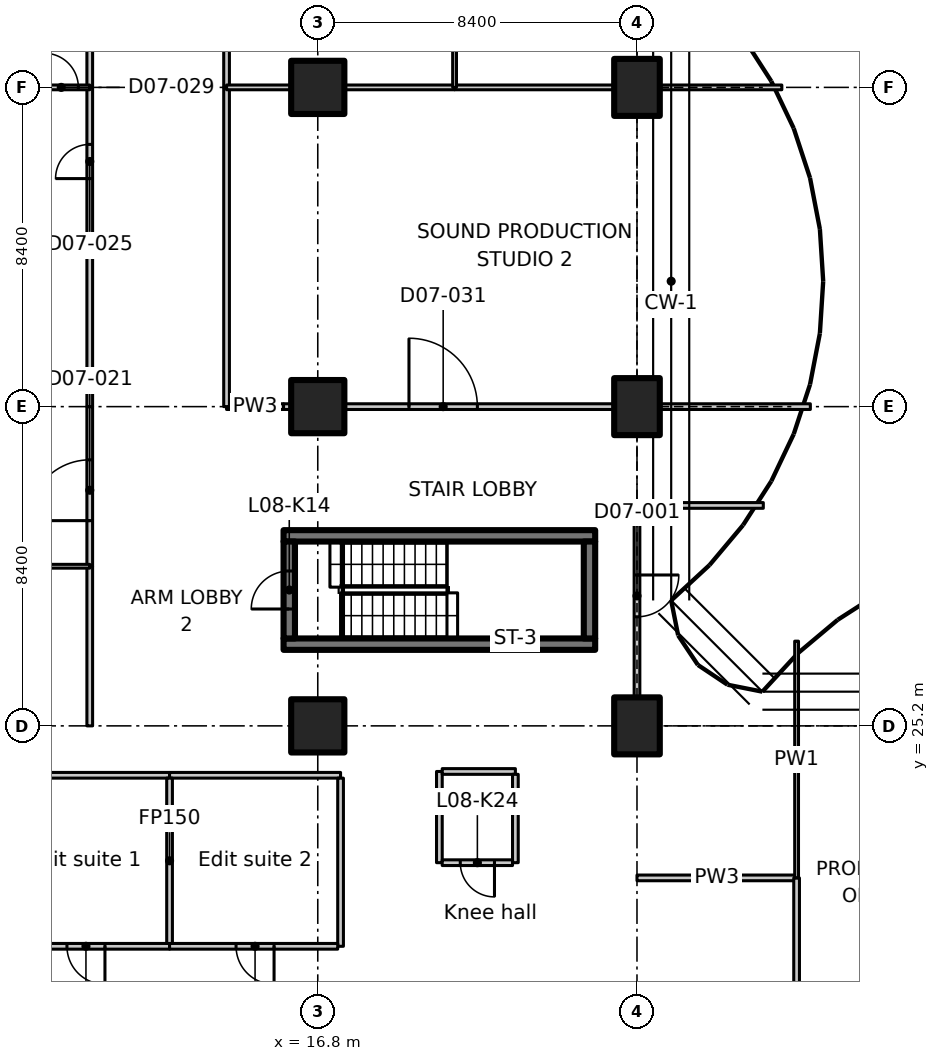
"""IFC4 building model, lengths in metres.
Left out: names, types, materials, properties, quantities, classifications, styles, units other than length and angle.
Written with IfcOpenShell. Run it as: python <this file> out.ifc"""

import sys

from ifc_helpers import new_model, si_unit, direction, frame, frame_2d, origin, origin_2d, place, context, subcontext, project, spatial, polyline, rectangle, outline, extrude, element, fill, save


model = new_model("IFC4")
c1 = context("Model", 3, precision=1e-05, world=origin(), true_north=direction((0.0, 1.0)))
c2 = subcontext(c1, "Body", "Model", "MODEL_VIEW")
j1 = project(units=[si_unit("LENGTHUNIT", "METRE"), si_unit("PLANEANGLEUNIT", "RADIAN")], contexts=[c1])
p1 = place(None, origin())
s1 = spatial("IfcSite", under=j1, at=p1, CompositionType="ELEMENT")
p2 = place(p1, origin())
s2 = spatial("IfcBuilding", under=s1, at=p2, CompositionType="ELEMENT")
p3 = place(p2, frame((0.0, 0.0, 43.7)))
s3 = spatial("IfcBuildingStorey", under=s2, at=p3, CompositionType="ELEMENT", Elevation=43.7)
for number, where, z_axis, x_axis in (
    (1, (16.8, 25.2, 0.0), (0.0, 0.0, 1.0), (1.0, 0.0, 0.0)),
    (2, (16.8, 33.6, 0.0), (0.0, 0.0, 1.0), (1.0, 0.0, 0.0)),
    (3, (16.8, 42.0, 0.0), (0.0, 0.0, 1.0), (1.0, 0.0, 0.0)),
):
    element("IfcColumn", number, at=place(p3, frame(where, z_axis=z_axis, x_axis=x_axis)), inside=s3, PredefinedType="COLUMN", context=c2, shape_type="SweptSolid", body=[
        extrude(rectangle(XDim=1.4, YDim=1.4, at=origin_2d()), origin(), (0.0, 0.0, 1.0), 3.35),
    ])
for number, where, z_axis, x_axis in (
    (4, (25.2, 25.2, 0.0), (0.0, 0.0, 1.0), (1.0, 0.0, 0.0)),
    (5, (25.2, 33.6, 0.0), (0.0, 0.0, 1.0), (1.0, 0.0, 0.0)),
    (6, (25.2, 42.0, 0.0), (0.0, 0.0, 1.0), (1.0, 0.0, 0.0)),
):
    element("IfcColumn", number, at=place(p3, frame(where, z_axis=z_axis, x_axis=x_axis)), inside=s3, PredefinedType="COLUMN", context=c2, shape_type="SweptSolid", body=[
        extrude(rectangle(XDim=1.2, YDim=1.5, at=origin_2d()), origin(), (0.0, 0.0, 1.0), 3.35),
    ])
for number, where, z_axis, x_axis in (
    (7, (15.9, 27.35, 0.0), (0.0, 0.0, 1.0), (1.0, 0.0, 0.0)),
    (8, (15.9, 30.2, 0.0), (0.0, 0.0, 1.0), (1.0, 0.0, 0.0)),
):
    element("IfcWall", number, at=place(p3, frame(where, z_axis=z_axis, x_axis=x_axis)), inside=s3, PredefinedType="SHEAR", context=c2, shape_type="SweptSolid", body=[
        extrude(rectangle(XDim=8.2, YDim=0.3, at=frame_2d((4.1, 0.0))), origin(), (0.0, 0.0, 1.0), 3.35),
    ])
p4 = place(p3, frame((16.05, 27.5, 0.0), z_axis=(0.0, 0.0, 1.0), x_axis=(0.0, 1.0, 0.0)))
e9 = element("IfcWall", 9, at=p4, inside=s3, PredefinedType="SHEAR", context=c2, shape_type="SweptSolid", body=[
    extrude(rectangle(XDim=2.55, YDim=0.3, at=frame_2d((1.275, 0.0))), origin(), (0.0, 0.0, 1.0), 3.35),
])
p5 = place(p4, frame((0.775, 0.0, 0.0)))
e10 = element("IfcOpeningElement", 10, at=p5, cuts=e9, PredefinedType="OPENING", context=c2, shape_type="SweptSolid", body=[
    extrude(rectangle(XDim=1.0, YDim=2.1, at=frame_2d((0.5, 1.05))), frame((0.0, 0.16, 0.0), z_axis=(0.0, -1.0, 0.0), x_axis=(1.0, 0.0, 0.0)), (0.0, 0.0, 1.0), 0.32),
])
p6 = place(p3, frame((23.95, 27.5, 0.0), z_axis=(0.0, 0.0, 1.0), x_axis=(0.0, 1.0, 0.0)))
e11 = element("IfcWall", 11, at=p6, inside=s3, PredefinedType="SHEAR", context=c2, shape_type="SweptSolid", body=[
    extrude(rectangle(XDim=2.55, YDim=0.3, at=frame_2d((1.275, 0.0))), origin(), (0.0, 0.0, 1.0), 3.35),
])
p7 = place(p3, frame((12.9, 19.4, 0.0), z_axis=(0.0, 0.0, 1.0), x_axis=(-1.0, 0.0, 0.0)))
e12 = element("IfcWall", 12, at=p7, inside=s3, PredefinedType="PARTITIONING", context=c2, shape_type="SweptSolid", body=[
    extrude(rectangle(XDim=4.4, YDim=0.15, at=frame_2d((2.2, 0.0))), origin(), (0.0, 0.0, 1.0), 3.35),
])
p8 = place(p7, frame((1.7, 0.0, 0.0)))
e13 = element("IfcOpeningElement", 13, at=p8, cuts=e12, PredefinedType="OPENING", context=c2, shape_type="SweptSolid", body=[
    extrude(rectangle(XDim=1.0, YDim=2.1, at=frame_2d((0.5, 1.05))), frame((0.0, 0.085, 0.0), z_axis=(0.0, -1.0, 0.0), x_axis=(1.0, 0.0, 0.0)), (0.0, 0.0, 1.0), 0.17),
])
p9 = place(p3, frame((8.575, 23.9, 0.0), z_axis=(0.0, 0.0, 1.0), x_axis=(1.0, 0.0, 0.0)))
e14 = element("IfcWall", 14, at=p9, inside=s3, PredefinedType="PARTITIONING", context=c2, shape_type="SweptSolid", body=[
    extrude(rectangle(XDim=4.325, YDim=0.15, at=frame_2d((2.163, 0.0))), origin(), (0.0, 0.0, 1.0), 3.35),
])
p10 = place(p3, frame((12.9, 23.9, 0.0), z_axis=(0.0, 0.0, 1.0), x_axis=(1.0, 0.0, 0.0)))
e15 = element("IfcWall", 15, at=p10, inside=s3, PredefinedType="PARTITIONING", context=c2, shape_type="SweptSolid", body=[
    extrude(rectangle(XDim=4.5, YDim=0.15, at=frame_2d((2.25, 0.0))), origin(), (0.0, 0.0, 1.0), 3.35),
])
p11 = place(p3, frame((17.4, 23.825, 0.0), z_axis=(0.0, 0.0, 1.0), x_axis=(0.0, -1.0, 0.0)))
e16 = element("IfcWall", 16, at=p11, inside=s3, PredefinedType="PARTITIONING", context=c2, shape_type="SweptSolid", body=[
    extrude(rectangle(XDim=4.425, YDim=0.15, at=frame_2d((2.212, 0.0))), origin(), (0.0, 0.0, 1.0), 3.35),
])
p12 = place(p3, frame((17.325, 19.4, 0.0), z_axis=(0.0, 0.0, 1.0), x_axis=(-1.0, 0.0, 0.0)))
e17 = element("IfcWall", 17, at=p12, inside=s3, PredefinedType="PARTITIONING", context=c2, shape_type="SweptSolid", body=[
    extrude(rectangle(XDim=4.425, YDim=0.15, at=frame_2d((2.212, 0.0))), origin(), (0.0, 0.0, 1.0), 3.35),
])
p13 = place(p12, frame((1.675, 0.0, 0.0)))
e18 = element("IfcOpeningElement", 18, at=p13, cuts=e17, PredefinedType="OPENING", context=c2, shape_type="SweptSolid", body=[
    extrude(rectangle(XDim=1.0, YDim=2.1, at=frame_2d((0.5, 1.05))), frame((0.0, 0.085, 0.0), z_axis=(0.0, -1.0, 0.0), x_axis=(1.0, 0.0, 0.0)), (0.0, 0.0, 1.0), 0.17),
])
p14 = place(p3, frame((12.9, 23.825, 0.0), z_axis=(0.0, 0.0, 1.0), x_axis=(0.0, -1.0, 0.0)))
e19 = element("IfcWall", 19, at=p14, inside=s3, PredefinedType="PARTITIONING", context=c2, shape_type="SweptSolid", body=[
    extrude(rectangle(XDim=4.35, YDim=0.15, at=frame_2d((2.175, 0.0))), origin(), (0.0, 0.0, 1.0), 3.35),
])
p15 = place(p3, frame((20.0, 21.6, 0.0), z_axis=(0.0, 0.0, 1.0), x_axis=(0.0, 1.0, 0.0)))
e20 = element("IfcWall", 20, at=p15, inside=s3, PredefinedType="PARTITIONING", context=c2, shape_type="SweptSolid", body=[
    extrude(rectangle(XDim=2.4, YDim=0.15, at=frame_2d((1.2, 0.0))), origin(), (0.0, 0.0, 1.0), 3.35),
])
p16 = place(p3, frame((20.075, 24.0, 0.0), z_axis=(0.0, 0.0, 1.0), x_axis=(1.0, 0.0, 0.0)))
e21 = element("IfcWall", 21, at=p16, inside=s3, PredefinedType="PARTITIONING", context=c2, shape_type="SweptSolid", body=[
    extrude(rectangle(XDim=1.925, YDim=0.15, at=frame_2d((0.962, 0.0))), origin(), (0.0, 0.0, 1.0), 3.35),
])
p17 = place(p3, frame((22.0, 23.925, 0.0), z_axis=(0.0, 0.0, 1.0), x_axis=(0.0, -1.0, 0.0)))
e22 = element("IfcWall", 22, at=p17, inside=s3, PredefinedType="PARTITIONING", context=c2, shape_type="SweptSolid", body=[
    extrude(rectangle(XDim=2.325, YDim=0.15, at=frame_2d((1.163, 0.0))), origin(), (0.0, 0.0, 1.0), 3.35),
])
p18 = place(p3, frame((21.925, 21.6, 0.0), z_axis=(0.0, 0.0, 1.0), x_axis=(-1.0, 0.0, 0.0)))
e23 = element("IfcWall", 23, at=p18, inside=s3, PredefinedType="PARTITIONING", context=c2, shape_type="SweptSolid", body=[
    extrude(rectangle(XDim=1.85, YDim=0.15, at=frame_2d((0.925, 0.0))), origin(), (0.0, 0.0, 1.0), 3.35),
])
p19 = place(p18, frame((0.475, 0.0, 0.0)))
e24 = element("IfcOpeningElement", 24, at=p19, cuts=e23, PredefinedType="OPENING", context=c2, shape_type="SweptSolid", body=[
    extrude(rectangle(XDim=0.9, YDim=2.1, at=frame_2d((0.45, 1.05))), frame((0.0, 0.085, 0.0), z_axis=(0.0, -1.0, 0.0), x_axis=(1.0, 0.0, 0.0)), (0.0, 0.0, 1.0), 0.17),
])
p20 = place(p3, frame((25.2, 21.2, 0.0), z_axis=(0.0, 0.0, 1.0), x_axis=(1.0, 0.0, 0.0)))
e25 = element("IfcWall", 25, at=p20, inside=s3, PredefinedType="PARTITIONING", context=c2, shape_type="SweptSolid", body=[
    extrude(rectangle(XDim=4.2, YDim=0.15, at=frame_2d((2.1, 0.0))), origin(), (0.0, 0.0, 1.0), 3.33),
])
p21 = place(p3, frame((29.4, 21.2, 0.0), z_axis=(0.0, 0.0, 1.0), x_axis=(0.0, -1.0, 0.0)))
e26 = element("IfcWall", 26, at=p21, inside=s3, PredefinedType="PARTITIONING", context=c2, shape_type="SweptSolid", body=[
    extrude(rectangle(XDim=8.2, YDim=0.15, at=frame_2d((4.1, 0.0))), origin(), (0.0, 0.0, 1.0), 3.33),
])
p22 = place(p21, frame((3.3, 0.0, 0.0)))
e27 = element("IfcOpeningElement", 27, at=p22, cuts=e26, PredefinedType="OPENING", context=c2, shape_type="SweptSolid", body=[
    extrude(rectangle(XDim=1.6, YDim=2.1, at=frame_2d((0.8, 1.05))), frame((0.0, 0.085, 0.0), z_axis=(0.0, -1.0, 0.0), x_axis=(1.0, 0.0, 0.0)), (0.0, 0.0, 1.0), 0.17),
])
p23 = place(p3, frame((29.4, 27.429, 0.0), z_axis=(0.0, 0.0, 1.0), x_axis=(0.0, -1.0, 0.0)))
e28 = element("IfcWall", 28, at=p23, inside=s3, PredefinedType="PARTITIONING", context=c2, shape_type="SweptSolid", body=[
    extrude(outline(polyline([(0.0, 0.0), (6.229, 0.0), (6.229, 3.33), (2.679, 3.33), (2.677, 2.98), (1.781, 2.98), (1.779, 3.33), (0.154, 3.33), (0.0, 3.33), (0.0, 0.0)])), frame((0.0, 0.05, 0.0), z_axis=(0.0, -1.0, 0.0), x_axis=(1.0, 0.0, 0.0)), (0.0, 0.0, 1.0), 0.1),
])
p24 = place(p3, frame((25.2, 31.0, 0.0), z_axis=(0.0, 0.0, 1.0), x_axis=(0.0, -1.0, 0.0)))
e29 = element("IfcWall", 29, at=p24, inside=s3, PredefinedType="PARTITIONING", context=c2, shape_type="SweptSolid", body=[
    extrude(outline(polyline([(0.0, 0.0), (5.03, 0.0), (5.03, 2.98), (0.0, 2.98), (0.0, 0.0)])), frame((0.0, 0.075, 0.0), z_axis=(0.0, -1.0, 0.0), x_axis=(1.0, 0.0, 0.0)), (0.0, 0.0, 1.0), 0.15),
])
p25 = place(p24, frame((1.83, 0.0, 0.0)))
e30 = element("IfcOpeningElement", 30, at=p25, cuts=e29, PredefinedType="OPENING", context=c2, shape_type="SweptSolid", body=[
    extrude(rectangle(XDim=1.1, YDim=2.1, at=frame_2d((0.55, 1.05))), frame((0.0, 0.085, 0.0), z_axis=(0.0, -1.0, 0.0), x_axis=(1.0, 0.0, 0.0)), (0.0, 0.0, 1.0), 0.17),
])
p26 = place(p3, frame((25.2, 31.0, 0.0), z_axis=(0.0, 0.0, 1.0), x_axis=(1.0, 0.0, 0.0)))
e31 = element("IfcWall", 31, at=p26, inside=s3, PredefinedType="PARTITIONING", context=c2, shape_type="SweptSolid", body=[
    extrude(rectangle(XDim=3.324, YDim=0.15, at=frame_2d((1.662, 0.0))), origin(), (0.0, 0.0, 1.0), 2.98),
])
p27 = place(p3, frame((10.8, 29.4, 0.0), z_axis=(0.0, 0.0, 1.0), x_axis=(0.0, 1.0, 0.0)))
e32 = element("IfcWall", 32, at=p27, inside=s3, PredefinedType="PARTITIONING", context=c2, shape_type="SweptSolid", body=[
    extrude(rectangle(XDim=4.2, YDim=0.15, at=frame_2d((2.1, 0.0))), origin(), (0.0, 0.0, 1.0), 3.33),
])
p28 = place(p27, frame((1.2, 0.0, 0.0)))
e33 = element("IfcOpeningElement", 33, at=p28, cuts=e32, PredefinedType="OPENING", context=c2, shape_type="SweptSolid", body=[
    extrude(rectangle(XDim=1.6, YDim=2.1, at=frame_2d((0.8, 1.05))), frame((0.0, 0.085, 0.0), z_axis=(0.0, -1.0, 0.0), x_axis=(1.0, 0.0, 0.0)), (0.0, 0.0, 1.0), 0.17),
])
p29 = place(p3, frame((10.8, 25.2, 0.0), z_axis=(0.0, 0.0, 1.0), x_axis=(0.0, 1.0, 0.0)))
e34 = element("IfcWall", 34, at=p29, inside=s3, PredefinedType="PARTITIONING", context=c2, shape_type="SweptSolid", body=[
    extrude(rectangle(XDim=4.2, YDim=0.15, at=frame_2d((2.1, 0.0))), origin(), (0.0, 0.0, 1.0), 3.33),
])
p30 = place(p3, frame((14.4, 33.6, 0.0), z_axis=(0.0, 0.0, 1.0), x_axis=(1.0, 0.0, 0.0)))
e35 = element("IfcWall", 35, at=p30, inside=s3, PredefinedType="PARTITIONING", context=c2, shape_type="SweptSolid", body=[
    extrude(rectangle(XDim=1.5, YDim=0.15, at=frame_2d((0.75, 0.0))), origin(), (0.0, 0.0, 1.0), 3.33),
])
p31 = place(p3, frame((15.9, 33.6, 0.0), z_axis=(0.0, 0.0, 1.0), x_axis=(1.0, 0.0, 0.0)))
e36 = element("IfcWall", 36, at=p31, inside=s3, PredefinedType="PARTITIONING", context=c2, shape_type="SweptSolid", body=[
    extrude(rectangle(XDim=8.68, YDim=0.15, at=frame_2d((4.34, 0.0))), origin(), (0.0, 0.0, 1.0), 3.33),
])
p32 = place(p31, frame((3.3, 0.0, 0.0)))
e37 = element("IfcOpeningElement", 37, at=p32, cuts=e36, PredefinedType="OPENING", context=c2, shape_type="SweptSolid", body=[
    extrude(rectangle(XDim=1.8, YDim=2.1, at=frame_2d((0.9, 1.05))), frame((0.0, 0.085, 0.0), z_axis=(0.0, -1.0, 0.0), x_axis=(1.0, 0.0, 0.0)), (0.0, 0.0, 1.0), 0.17),
])
p33 = place(p3, frame((25.82, 33.6, 0.0), z_axis=(0.0, 0.0, 1.0), x_axis=(1.0, 0.0, 0.0)))
e38 = element("IfcWall", 38, at=p33, inside=s3, PredefinedType="PARTITIONING", context=c2, shape_type="SweptSolid", body=[
    extrude(rectangle(XDim=3.942, YDim=0.15, at=frame_2d((1.971, 0.0))), origin(), (0.0, 0.0, 1.0), 2.98),
])
p34 = place(p3, frame((10.8, 33.6, 0.0), z_axis=(0.0, 0.0, 1.0), x_axis=(0.0, 1.0, 0.0)))
e39 = element("IfcWall", 39, at=p34, inside=s3, PredefinedType="PARTITIONING", context=c2, shape_type="SweptSolid", body=[
    extrude(rectangle(XDim=4.2, YDim=0.15, at=frame_2d((2.1, 0.0))), origin(), (0.0, 0.0, 1.0), 3.33),
])
p35 = place(p3, frame((10.8, 37.8, 0.0), z_axis=(0.0, 0.0, 1.0), x_axis=(0.0, 1.0, 0.0)))
e40 = element("IfcWall", 40, at=p35, inside=s3, PredefinedType="PARTITIONING", context=c2, shape_type="SweptSolid", body=[
    extrude(rectangle(XDim=4.2, YDim=0.15, at=frame_2d((2.1, 0.0))), origin(), (0.0, 0.0, 1.0), 3.33),
])
p36 = place(p35, frame((1.8, 0.0, 0.0)))
e41 = element("IfcOpeningElement", 41, at=p36, cuts=e40, PredefinedType="OPENING", context=c2, shape_type="SweptSolid", body=[
    extrude(rectangle(XDim=0.9, YDim=2.1, at=frame_2d((0.45, 1.05))), frame((0.0, 0.085, 0.0), z_axis=(0.0, -1.0, 0.0), x_axis=(1.0, 0.0, 0.0)), (0.0, 0.0, 1.0), 0.17),
])
p37 = place(p3, frame((10.8, 42.0, 0.0), z_axis=(0.0, 0.0, 1.0), x_axis=(0.0, 1.0, 0.0)))
e42 = element("IfcWall", 42, at=p37, inside=s3, PredefinedType="PARTITIONING", context=c2, shape_type="SweptSolid", body=[
    extrude(rectangle(XDim=4.2, YDim=0.15, at=frame_2d((2.1, 0.0))), origin(), (0.0, 0.0, 1.0), 3.33),
])
p38 = place(p3, frame((14.4, 42.0, 0.0), z_axis=(0.0, 0.0, 1.0), x_axis=(0.0, -1.0, 0.0)))
e43 = element("IfcWall", 43, at=p38, inside=s3, PredefinedType="PARTITIONING", context=c2, shape_type="SweptSolid", body=[
    extrude(rectangle(XDim=8.4, YDim=0.15, at=frame_2d((4.2, 0.0))), origin(), (0.0, 0.0, 1.0), 3.33),
])
p39 = place(p3, frame((14.4, 46.2, 0.0), z_axis=(0.0, 0.0, 1.0), x_axis=(0.0, -1.0, 0.0)))
e44 = element("IfcWall", 44, at=p39, inside=s3, PredefinedType="PARTITIONING", context=c2, shape_type="SweptSolid", body=[
    extrude(rectangle(XDim=4.2, YDim=0.15, at=frame_2d((2.1, 0.0))), origin(), (0.0, 0.0, 1.0), 3.33),
])
p40 = place(p3, frame((10.8, 29.4, 0.0), z_axis=(0.0, 0.0, 1.0), x_axis=(-1.0, 0.0, 0.0)))
e45 = element("IfcWall", 45, at=p40, inside=s3, PredefinedType="PARTITIONING", context=c2, shape_type="SweptSolid", body=[
    extrude(rectangle(XDim=3.6, YDim=0.1, at=frame_2d((1.8, 0.0))), origin(), (0.0, 0.0, 1.0), 3.33),
])
p41 = place(p3, frame((-1.174, 37.8, 0.0), z_axis=(0.0, 0.0, 1.0), x_axis=(1.0, 0.0, 0.0)))
e46 = element("IfcWall", 46, at=p41, inside=s3, PredefinedType="PARTITIONING", context=c2, shape_type="SweptSolid", body=[
    extrude(outline(polyline([(0.0, 0.0), (11.974, 0.0), (11.974, 3.33), (1.624, 3.33), (1.622, 2.98), (0.726, 2.98), (0.724, 3.33), (0.074, 3.33), (0.0, 3.33), (0.0, 0.0)])), frame((0.0, 0.062, 0.0), z_axis=(0.0, -1.0, 0.0), x_axis=(1.0, 0.0, 0.0)), (0.0, 0.0, 1.0), 0.125),
])
p42 = place(p3, frame((6.6, 42.0, 0.0), z_axis=(0.0, 0.0, 1.0), x_axis=(1.0, 0.0, 0.0)))
e47 = element("IfcWall", 47, at=p42, inside=s3, PredefinedType="PARTITIONING", context=c2, shape_type="SweptSolid", body=[
    extrude(rectangle(XDim=4.2, YDim=0.125, at=frame_2d((2.1, 0.0))), origin(), (0.0, 0.0, 1.0), 3.33),
])
p43 = place(p42, frame((3.0, 0.0, 0.0)))
e48 = element("IfcOpeningElement", 48, at=p43, cuts=e47, PredefinedType="OPENING", context=c2, shape_type="SweptSolid", body=[
    extrude(rectangle(XDim=0.9, YDim=2.1, at=frame_2d((0.45, 1.05))), frame((0.0, 0.073, 0.0), z_axis=(0.0, -1.0, 0.0), x_axis=(1.0, 0.0, 0.0)), (0.0, 0.0, 1.0), 0.145),
])
p44 = place(p3, frame((14.4, 42.0, 0.0), z_axis=(0.0, 0.0, 1.0), x_axis=(1.0, 0.0, 0.0)))
e49 = element("IfcWall", 49, at=p44, inside=s3, PredefinedType="PARTITIONING", context=c2, shape_type="SweptSolid", body=[
    extrude(rectangle(XDim=6.0, YDim=0.125, at=frame_2d((3.0, 0.0))), origin(), (0.0, 0.0, 1.0), 3.33),
])
p45 = place(p3, frame((20.4, 42.0, 0.0), z_axis=(0.0, 0.0, 1.0), x_axis=(1.0, 0.0, 0.0)))
e50 = element("IfcWall", 50, at=p45, inside=s3, PredefinedType="PARTITIONING", context=c2, shape_type="SweptSolid", body=[
    extrude(rectangle(XDim=4.18, YDim=0.125, at=frame_2d((2.09, 0.0))), origin(), (0.0, 0.0, 1.0), 3.33),
])
p46 = place(p3, frame((25.82, 42.0, 0.0), z_axis=(0.0, 0.0, 1.0), x_axis=(1.0, 0.0, 0.0)))
e51 = element("IfcWall", 51, at=p46, inside=s3, PredefinedType="PARTITIONING", context=c2, shape_type="SweptSolid", body=[
    extrude(rectangle(XDim=3.191, YDim=0.125, at=frame_2d((1.596, 0.0))), origin(), (0.0, 0.0, 1.0), 2.98),
])
p47 = place(p3, frame((20.4, 46.2, 0.0), z_axis=(0.0, 0.0, 1.0), x_axis=(0.0, -1.0, 0.0)))
e52 = element("IfcWall", 52, at=p47, inside=s3, PredefinedType="PARTITIONING", context=c2, shape_type="SweptSolid", body=[
    extrude(rectangle(XDim=4.2, YDim=0.1, at=frame_2d((2.1, 0.0))), origin(), (0.0, 0.0, 1.0), 3.33),
])
p48 = place(p5, origin())
e53 = element("IfcDoor", 53, at=p48, inside=s3, OperationType="SINGLE_SWING_RIGHT", PredefinedType="DOOR", context=c2, shape_type="SweptSolid", body=[
    extrude(rectangle(XDim=1.0, YDim=2.1, at=frame_2d((0.5, 1.05))), frame((0.0, 0.025, 0.0), z_axis=(0.0, -1.0, 0.0), x_axis=(1.0, 0.0, 0.0)), (0.0, 0.0, 1.0), 0.05),
])
fill(e10, e53)
p49 = place(p19, origin())
e54 = element("IfcDoor", 54, at=p49, inside=s3, OperationType="SINGLE_SWING_RIGHT", PredefinedType="DOOR", context=c2, shape_type="SweptSolid", body=[
    extrude(rectangle(XDim=0.9, YDim=2.1, at=frame_2d((0.45, 1.05))), frame((0.0, 0.025, 0.0), z_axis=(0.0, -1.0, 0.0), x_axis=(1.0, 0.0, 0.0)), (0.0, 0.0, 1.0), 0.05),
])
fill(e24, e54)
p50 = place(p8, origin())
e55 = element("IfcDoor", 55, at=p50, inside=s3, OperationType="SINGLE_SWING_LEFT", PredefinedType="DOOR", context=c2, shape_type="SweptSolid", body=[
    extrude(rectangle(XDim=1.0, YDim=2.1, at=frame_2d((0.5, 1.05))), frame((0.0, 0.025, 0.0), z_axis=(0.0, -1.0, 0.0), x_axis=(1.0, 0.0, 0.0)), (0.0, 0.0, 1.0), 0.05),
])
fill(e13, e55)
p51 = place(p13, origin())
e56 = element("IfcDoor", 56, at=p51, inside=s3, OperationType="SINGLE_SWING_RIGHT", PredefinedType="DOOR", context=c2, shape_type="SweptSolid", body=[
    extrude(rectangle(XDim=1.0, YDim=2.1, at=frame_2d((0.5, 1.05))), frame((0.0, 0.025, 0.0), z_axis=(0.0, -1.0, 0.0), x_axis=(1.0, 0.0, 0.0)), (0.0, 0.0, 1.0), 0.05),
])
fill(e18, e56)
p52 = place(p25, origin())
e57 = element("IfcDoor", 57, at=p52, inside=s3, OperationType="SINGLE_SWING_RIGHT", PredefinedType="DOOR", context=c2, shape_type="SweptSolid", body=[
    extrude(rectangle(XDim=1.1, YDim=2.1, at=frame_2d((0.55, 1.05))), frame((0.0, 0.025, 0.0), z_axis=(0.0, -1.0, 0.0), x_axis=(1.0, 0.0, 0.0)), (0.0, 0.0, 1.0), 0.05),
])
fill(e30, e57)
p53 = place(p28, origin())
e58 = element("IfcDoor", 58, at=p53, inside=s3, OperationType="DOUBLE_DOOR_SINGLE_SWING", PredefinedType="DOOR", context=c2, shape_type="SweptSolid", body=[
    extrude(rectangle(XDim=1.6, YDim=2.1, at=frame_2d((0.8, 1.05))), frame((0.0, 0.025, 0.0), z_axis=(0.0, -1.0, 0.0), x_axis=(1.0, 0.0, 0.0)), (0.0, 0.0, 1.0), 0.05),
])
fill(e33, e58)
p54 = place(p36, origin())
e59 = element("IfcDoor", 59, at=p54, inside=s3, OperationType="SINGLE_SWING_LEFT", PredefinedType="DOOR", context=c2, shape_type="SweptSolid", body=[
    extrude(rectangle(XDim=0.9, YDim=2.1, at=frame_2d((0.45, 1.05))), frame((0.0, 0.025, 0.0), z_axis=(0.0, -1.0, 0.0), x_axis=(1.0, 0.0, 0.0)), (0.0, 0.0, 1.0), 0.05),
])
fill(e41, e59)
p55 = place(p43, origin())
e60 = element("IfcDoor", 60, at=p55, inside=s3, OperationType="SINGLE_SWING_RIGHT", PredefinedType="DOOR", context=c2, shape_type="SweptSolid", body=[
    extrude(rectangle(XDim=0.9, YDim=2.1, at=frame_2d((0.45, 1.05))), frame((0.0, 0.025, 0.0), z_axis=(0.0, -1.0, 0.0), x_axis=(1.0, 0.0, 0.0)), (0.0, 0.0, 1.0), 0.05),
])
fill(e48, e60)
p56 = place(p32, origin())
e61 = element("IfcDoor", 61, at=p56, inside=s3, OperationType="DOUBLE_DOOR_SINGLE_SWING", PredefinedType="DOOR", context=c2, shape_type="SweptSolid", body=[
    extrude(rectangle(XDim=1.8, YDim=2.1, at=frame_2d((0.9, 1.05))), frame((0.0, 0.025, 0.0), z_axis=(0.0, -1.0, 0.0), x_axis=(1.0, 0.0, 0.0)), (0.0, 0.0, 1.0), 0.05),
])
fill(e37, e61)
save(model, sys.argv[1])
